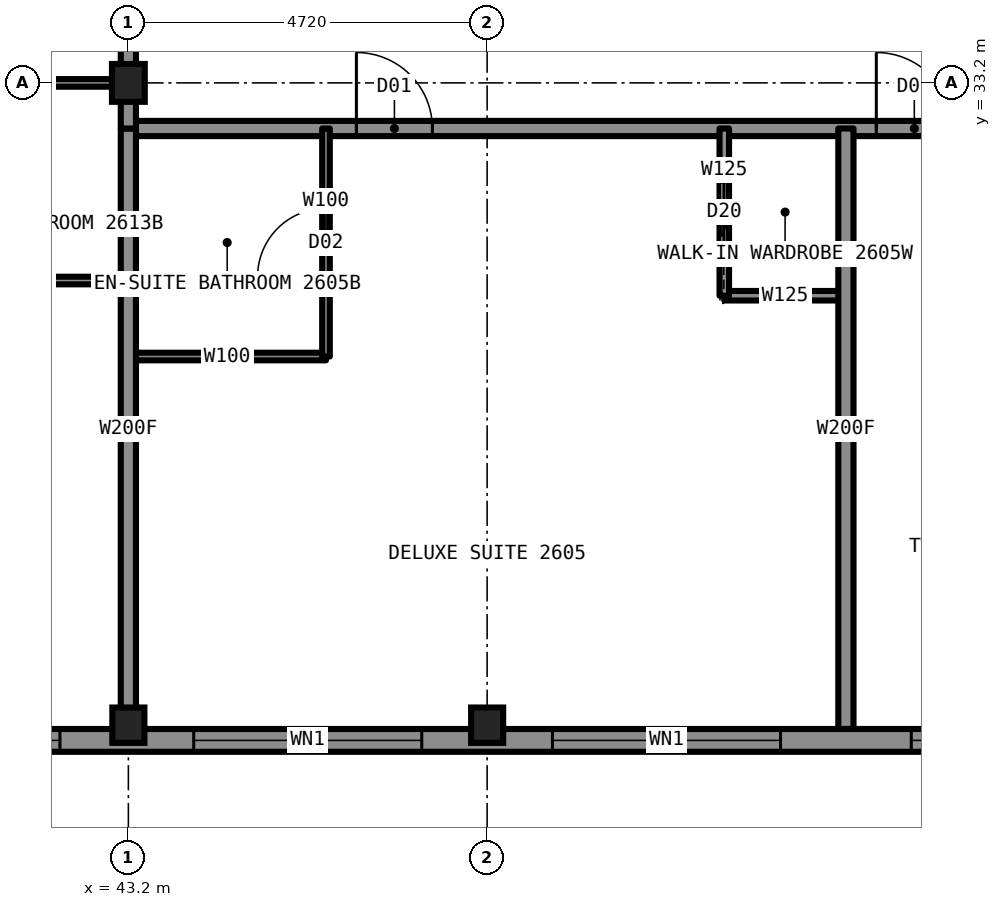
"""IFC4 building model, lengths in metres.
Left out: names, types, materials, properties, quantities, classifications, styles, units other than length and angle.
Written with IfcOpenShell. Run it as: python <this file> out.ifc"""

import sys

from ifc_helpers import new_model, si_unit, direction, frame, frame_2d, origin, origin_2d, place, context, subcontext, project, spatial, rectangle, i_section, extrude, element, fill, save


model = new_model("IFC4")
c1 = context("Model", 3, precision=1e-05, world=origin(), true_north=direction((0.0, 1.0)))
c2 = subcontext(c1, "Body", "Model", "MODEL_VIEW")
j1 = project(units=[si_unit("LENGTHUNIT", "METRE"), si_unit("PLANEANGLEUNIT", "RADIAN")], contexts=[c1])
p1 = place(None, origin())
s1 = spatial("IfcSite", under=j1, at=p1, CompositionType="ELEMENT")
p2 = place(p1, origin())
s2 = spatial("IfcBuilding", under=s1, at=p2, CompositionType="ELEMENT")
p3 = place(p2, frame((0.0, 0.0, 93.4)))
s3 = spatial("IfcBuildingStorey", under=s2, at=p3, CompositionType="ELEMENT", Elevation=93.4)
for number, where, z_axis, x_axis in (
    (1, (43.2, 24.75, 0.0), (0.0, 0.0, 1.0), (1.0, 0.0, 0.0)),
    (2, (47.92, 24.75, 0.0), (0.0, 0.0, 1.0), (1.0, 0.0, 0.0)),
):
    element("IfcColumn", number, at=place(p3, frame(where, z_axis=z_axis, x_axis=x_axis)), inside=s3, PredefinedType="COLUMN", context=c2, shape_type="SweptSolid", body=[
        extrude(i_section(OverallWidth=0.442, OverallDepth=0.531, WebThickness=0.066, FlangeThickness=0.106, at=origin_2d()), origin(), (0.0, 0.0, 1.0), 3.5),
    ])
p4 = place(p3, frame((43.2, 33.2, 0.0), z_axis=(0.0, 0.0, 1.0), x_axis=(1.0, 0.0, 0.0)))
e3 = element("IfcColumn", 3, at=p4, inside=s3, PredefinedType="COLUMN", context=c2, shape_type="SweptSolid", body=[
    extrude(i_section(OverallWidth=0.432, OverallDepth=0.498, WebThickness=0.056, FlangeThickness=0.089, at=origin_2d()), origin(), (0.0, 0.0, 1.0), 3.5),
])
p5 = place(p3, frame((40.6, 33.2, 0.0), z_axis=(0.0, 0.0, 1.0), x_axis=(1.0, 0.0, 0.0)))
e4 = element("IfcWall", 4, at=p5, inside=s3, PredefinedType="PARTITIONING", context=c2, shape_type="SweptSolid", body=[
    extrude(rectangle(XDim=2.6, YDim=0.1, at=frame_2d((1.3, 0.0))), origin(), (0.0, 0.0, 1.0), 2.573),
])
p6 = place(p3, frame((43.2, 32.6, 0.0), z_axis=(0.0, 0.0, 1.0), x_axis=(1.0, 0.0, 0.0)))
e5 = element("IfcWall", 5, at=p6, inside=s3, PredefinedType="PARTITIONING", context=c2, shape_type="SweptSolid", body=[
    extrude(rectangle(XDim=23.6, YDim=0.2, at=frame_2d((11.8, 0.0))), origin(), (0.0, 0.0, 1.0), 3.33),
])
p7 = place(p6, frame((3.0, 0.0, 0.0)))
e6 = element("IfcOpeningElement", 6, at=p7, cuts=e5, PredefinedType="OPENING", context=c2, shape_type="SweptSolid", body=[
    extrude(rectangle(XDim=1.0, YDim=2.2, at=frame_2d((0.5, 1.1))), frame((0.0, 0.11, 0.0), z_axis=(0.0, -1.0, 0.0), x_axis=(1.0, 0.0, 0.0)), (0.0, 0.0, 1.0), 0.22),
])
p8 = place(p6, frame((9.84, 0.0, 0.0)))
e7 = element("IfcOpeningElement", 7, at=p8, cuts=e5, PredefinedType="OPENING", context=c2, shape_type="SweptSolid", body=[
    extrude(rectangle(XDim=1.0, YDim=2.2, at=frame_2d((0.5, 1.1))), frame((0.0, 0.11, 0.0), z_axis=(0.0, -1.0, 0.0), x_axis=(1.0, 0.0, 0.0)), (0.0, 0.0, 1.0), 0.22),
])
p9 = place(p6, frame((17.16, 0.0, 0.0)))
e8 = element("IfcOpeningElement", 8, at=p9, cuts=e5, PredefinedType="OPENING", context=c2, shape_type="SweptSolid", body=[
    extrude(rectangle(XDim=1.0, YDim=2.2, at=frame_2d((0.5, 1.1))), frame((0.0, 0.11, 0.0), z_axis=(0.0, -1.0, 0.0), x_axis=(1.0, 0.0, 0.0)), (0.0, 0.0, 1.0), 0.22),
])
p10 = place(p3, frame((40.6, 30.6, 0.0), z_axis=(0.0, 0.0, 1.0), x_axis=(1.0, 0.0, 0.0)))
e9 = element("IfcWall", 9, at=p10, inside=s3, PredefinedType="PARTITIONING", context=c2, shape_type="SweptSolid", body=[
    extrude(rectangle(XDim=2.6, YDim=0.1, at=frame_2d((1.3, 0.0))), origin(), (0.0, 0.0, 1.0), 3.33),
])
p11 = place(p3, frame((51.04, 30.4, 0.0), z_axis=(0.0, 0.0, 1.0), x_axis=(1.0, 0.0, 0.0)))
e10 = element("IfcWall", 10, at=p11, inside=s3, PredefinedType="PARTITIONING", context=c2, shape_type="SweptSolid", body=[
    extrude(rectangle(XDim=1.6, YDim=0.125, at=frame_2d((0.8, 0.0))), origin(), (0.0, 0.0, 1.0), 3.33),
])
p12 = place(p3, frame((43.2, 29.6, 0.0), z_axis=(0.0, 0.0, 1.0), x_axis=(1.0, 0.0, 0.0)))
e11 = element("IfcWall", 11, at=p12, inside=s3, PredefinedType="PARTITIONING", context=c2, shape_type="SweptSolid", body=[
    extrude(rectangle(XDim=2.6, YDim=0.1, at=frame_2d((1.3, 0.0))), origin(), (0.0, 0.0, 1.0), 3.33),
])
p13 = place(p3, frame((43.2, 33.22, 0.0), z_axis=(0.0, 0.0, 1.0), x_axis=(0.0, 1.0, 0.0)))
e12 = element("IfcWall", 12, at=p13, inside=s3, PredefinedType="PARTITIONING", context=c2, shape_type="SweptSolid", body=[
    extrude(rectangle(XDim=23.56, YDim=0.2, at=frame_2d((11.78, 0.0))), origin(), (0.0, 0.0, 1.0), 3.33),
])
p14 = place(p13, frame((16.4, 0.0, 0.0)))
e13 = element("IfcOpeningElement", 13, at=p14, cuts=e12, PredefinedType="OPENING", context=c2, shape_type="SweptSolid", body=[
    extrude(rectangle(XDim=1.0, YDim=2.2, at=frame_2d((0.5, 1.1))), frame((0.0, 0.11, 0.0), z_axis=(0.0, -1.0, 0.0), x_axis=(1.0, 0.0, 0.0)), (0.0, 0.0, 1.0), 0.22),
])
p15 = place(p13, frame((21.83, 0.0, 0.0)))
e14 = element("IfcOpeningElement", 14, at=p15, cuts=e12, PredefinedType="OPENING", context=c2, shape_type="SweptSolid", body=[
    extrude(rectangle(XDim=1.1, YDim=2.2, at=frame_2d((0.55, 1.1))), frame((0.0, 0.11, 0.0), z_axis=(0.0, -1.0, 0.0), x_axis=(1.0, 0.0, 0.0)), (0.0, 0.0, 1.0), 0.22),
])
p16 = place(p13, frame((0.63, 0.0, 0.0)))
e15 = element("IfcOpeningElement", 15, at=p16, cuts=e12, PredefinedType="OPENING", context=c2, shape_type="SweptSolid", body=[
    extrude(rectangle(XDim=1.1, YDim=2.2, at=frame_2d((0.55, 1.1))), frame((0.0, 0.11, 0.0), z_axis=(0.0, -1.0, 0.0), x_axis=(1.0, 0.0, 0.0)), (0.0, 0.0, 1.0), 0.22),
])
p17 = place(p13, frame((7.45, 0.0, 0.0)))
e16 = element("IfcOpeningElement", 16, at=p17, cuts=e12, PredefinedType="OPENING", context=c2, shape_type="SweptSolid", body=[
    extrude(rectangle(XDim=2.0, YDim=2.4, at=frame_2d((1.0, 1.2))), frame((0.0, 0.11, 0.0), z_axis=(0.0, -1.0, 0.0), x_axis=(1.0, 0.0, 0.0)), (0.0, 0.0, 1.0), 0.22),
])
p18 = place(p13, frame((5.4, 0.0, 0.0)))
e17 = element("IfcOpeningElement", 17, at=p18, cuts=e12, PredefinedType="OPENING", context=c2, shape_type="SweptSolid", body=[
    extrude(rectangle(XDim=1.0, YDim=2.1, at=frame_2d((0.5, 1.05))), frame((0.0, 0.11, 0.0), z_axis=(0.0, -1.0, 0.0), x_axis=(1.0, 0.0, 0.0)), (0.0, 0.0, 1.0), 0.22),
])
p19 = place(p3, frame((43.2, 24.7, 0.0), z_axis=(0.0, 0.0, 1.0), x_axis=(0.0, 1.0, 0.0)))
e18 = element("IfcWall", 18, at=p19, inside=s3, PredefinedType="PARTITIONING", context=c2, shape_type="SweptSolid", body=[
    extrude(rectangle(XDim=7.9, YDim=0.2, at=frame_2d((3.95, 0.0))), origin(), (0.0, 0.0, 1.0), 2.573),
])
p20 = place(p3, frame((52.64, 24.7, 0.0), z_axis=(0.0, 0.0, 1.0), x_axis=(0.0, 1.0, 0.0)))
e19 = element("IfcWall", 19, at=p20, inside=s3, PredefinedType="PARTITIONING", context=c2, shape_type="SweptSolid", body=[
    extrude(rectangle(XDim=7.9, YDim=0.2, at=frame_2d((3.95, 0.0))), origin(), (0.0, 0.0, 1.0), 3.33),
])
p21 = place(p3, frame((51.04, 30.4, 0.0), z_axis=(0.0, 0.0, 1.0), x_axis=(0.0, 1.0, 0.0)))
e20 = element("IfcWall", 20, at=p21, inside=s3, PredefinedType="PARTITIONING", context=c2, shape_type="SweptSolid", body=[
    extrude(rectangle(XDim=2.2, YDim=0.125, at=frame_2d((1.1, 0.0))), origin(), (0.0, 0.0, 1.0), 3.33),
])
p22 = place(p21, frame((0.7, 0.0, 0.0)))
e21 = element("IfcOpeningElement", 21, at=p22, cuts=e20, PredefinedType="OPENING", context=c2, shape_type="SweptSolid", body=[
    extrude(rectangle(XDim=0.8, YDim=2.1, at=frame_2d((0.4, 1.05))), frame((0.0, 0.073, 0.0), z_axis=(0.0, -1.0, 0.0), x_axis=(1.0, 0.0, 0.0)), (0.0, 0.0, 1.0), 0.145),
])
p23 = place(p3, frame((45.8, 29.6, 0.0), z_axis=(0.0, 0.0, 1.0), x_axis=(0.0, 1.0, 0.0)))
e22 = element("IfcWall", 22, at=p23, inside=s3, PredefinedType="PARTITIONING", context=c2, shape_type="SweptSolid", body=[
    extrude(rectangle(XDim=3.0, YDim=0.1, at=frame_2d((1.5, 0.0))), origin(), (0.0, 0.0, 1.0), 3.33),
])
p24 = place(p23, frame((1.05, 0.0, 0.0)))
e23 = element("IfcOpeningElement", 23, at=p24, cuts=e22, PredefinedType="OPENING", context=c2, shape_type="SweptSolid", body=[
    extrude(rectangle(XDim=0.9, YDim=2.1, at=frame_2d((0.45, 1.05))), frame((0.0, 0.06, 0.0), z_axis=(0.0, -1.0, 0.0), x_axis=(1.0, 0.0, 0.0)), (0.0, 0.0, 1.0), 0.12),
])
p25 = place(p3, frame((39.9, 24.55, 0.0), z_axis=(0.0, 0.0, 1.0), x_axis=(1.0, 0.0, 0.0)))
e24 = element("IfcWall", 24, at=p25, inside=s3, PredefinedType="SOLIDWALL", context=c2, shape_type="SweptSolid", body=[
    extrude(rectangle(XDim=30.2, YDim=0.3, at=frame_2d((15.1, 0.0))), origin(), (0.0, 0.0, 1.0), 2.83),
])
p26 = place(p25, frame((0.85, 0.0, 0.5)))
e25 = element("IfcOpeningElement", 25, at=p26, cuts=e24, PredefinedType="OPENING", context=c2, shape_type="SweptSolid", body=[
    extrude(rectangle(XDim=1.6, YDim=2.0, at=frame_2d((0.8, 1.0))), frame((0.0, 0.16, 0.0), z_axis=(0.0, -1.0, 0.0), x_axis=(1.0, 0.0, 0.0)), (0.0, 0.0, 1.0), 0.32),
])
p27 = place(p25, frame((4.16, 0.0, 0.5)))
e26 = element("IfcOpeningElement", 26, at=p27, cuts=e24, PredefinedType="OPENING", context=c2, shape_type="SweptSolid", body=[
    extrude(rectangle(XDim=3.0, YDim=2.0, at=frame_2d((1.5, 1.0))), frame((0.0, 0.16, 0.0), z_axis=(0.0, -1.0, 0.0), x_axis=(1.0, 0.0, 0.0)), (0.0, 0.0, 1.0), 0.32),
])
p28 = place(p25, frame((8.88, 0.0, 0.5)))
e27 = element("IfcOpeningElement", 27, at=p28, cuts=e24, PredefinedType="OPENING", context=c2, shape_type="SweptSolid", body=[
    extrude(rectangle(XDim=3.0, YDim=2.0, at=frame_2d((1.5, 1.0))), frame((0.0, 0.16, 0.0), z_axis=(0.0, -1.0, 0.0), x_axis=(1.0, 0.0, 0.0)), (0.0, 0.0, 1.0), 0.32),
])
p29 = place(p25, frame((13.6, 0.0, 0.5)))
e28 = element("IfcOpeningElement", 28, at=p29, cuts=e24, PredefinedType="OPENING", context=c2, shape_type="SweptSolid", body=[
    extrude(rectangle(XDim=3.0, YDim=2.0, at=frame_2d((1.5, 1.0))), frame((0.0, 0.16, 0.0), z_axis=(0.0, -1.0, 0.0), x_axis=(1.0, 0.0, 0.0)), (0.0, 0.0, 1.0), 0.32),
])
p30 = place(p25, frame((18.32, 0.0, 0.5)))
e29 = element("IfcOpeningElement", 29, at=p30, cuts=e24, PredefinedType="OPENING", context=c2, shape_type="SweptSolid", body=[
    extrude(rectangle(XDim=3.0, YDim=2.0, at=frame_2d((1.5, 1.0))), frame((0.0, 0.16, 0.0), z_axis=(0.0, -1.0, 0.0), x_axis=(1.0, 0.0, 0.0)), (0.0, 0.0, 1.0), 0.32),
])
p31 = place(p25, frame((23.04, 0.0, 0.5)))
e30 = element("IfcOpeningElement", 30, at=p31, cuts=e24, PredefinedType="OPENING", context=c2, shape_type="SweptSolid", body=[
    extrude(rectangle(XDim=3.0, YDim=2.0, at=frame_2d((1.5, 1.0))), frame((0.0, 0.16, 0.0), z_axis=(0.0, -1.0, 0.0), x_axis=(1.0, 0.0, 0.0)), (0.0, 0.0, 1.0), 0.32),
])
p32 = place(p25, frame((27.75, 0.0, 0.5)))
e31 = element("IfcOpeningElement", 31, at=p32, cuts=e24, PredefinedType="OPENING", context=c2, shape_type="SweptSolid", body=[
    extrude(rectangle(XDim=1.6, YDim=2.0, at=frame_2d((0.8, 1.0))), frame((0.0, 0.16, 0.0), z_axis=(0.0, -1.0, 0.0), x_axis=(1.0, 0.0, 0.0)), (0.0, 0.0, 1.0), 0.32),
])
p33 = place(p3, frame((43.2, 32.6, 0.0), z_axis=(0.0, 0.0, 1.0), x_axis=(0.0, 1.0, 0.0)))
e32 = element("IfcWall", 32, at=p33, inside=s3, PredefinedType="PARTITIONING", context=c2, shape_type="SweptSolid", body=[
    extrude(rectangle(XDim=0.62, YDim=0.2, at=frame_2d((0.31, 0.0))), origin(), (0.0, 0.0, 1.0), 2.573),
])
p34 = place(p7, origin())
e33 = element("IfcDoor", 33, at=p34, inside=s3, OperationType="SINGLE_SWING_LEFT", PredefinedType="DOOR", context=c2, shape_type="SweptSolid", body=[
    extrude(rectangle(XDim=1.0, YDim=2.2, at=frame_2d((0.5, 1.1))), frame((0.0, 0.025, 0.0), z_axis=(0.0, -1.0, 0.0), x_axis=(1.0, 0.0, 0.0)), (0.0, 0.0, 1.0), 0.05),
])
fill(e6, e33)
p35 = place(p24, origin())
e34 = element("IfcDoor", 34, at=p35, inside=s3, OperationType="SINGLE_SWING_RIGHT", PredefinedType="DOOR", context=c2, shape_type="SweptSolid", body=[
    extrude(rectangle(XDim=0.9, YDim=2.1, at=frame_2d((0.45, 1.05))), frame((0.0, 0.025, 0.0), z_axis=(0.0, -1.0, 0.0), x_axis=(1.0, 0.0, 0.0)), (0.0, 0.0, 1.0), 0.05),
])
fill(e23, e34)
p36 = place(p22, origin())
e35 = element("IfcDoor", 35, at=p36, inside=s3, OperationType="SLIDING_TO_LEFT", PredefinedType="DOOR", context=c2, shape_type="SweptSolid", body=[
    extrude(rectangle(XDim=0.8, YDim=2.1, at=frame_2d((0.4, 1.05))), frame((0.0, 0.025, 0.0), z_axis=(0.0, -1.0, 0.0), x_axis=(1.0, 0.0, 0.0)), (0.0, 0.0, 1.0), 0.05),
])
fill(e21, e35)
p37 = place(p8, origin())
e36 = element("IfcDoor", 36, at=p37, inside=s3, OperationType="SINGLE_SWING_LEFT", PredefinedType="DOOR", context=c2, shape_type="SweptSolid", body=[
    extrude(rectangle(XDim=1.0, YDim=2.2, at=frame_2d((0.5, 1.1))), frame((0.0, 0.025, 0.0), z_axis=(0.0, -1.0, 0.0), x_axis=(1.0, 0.0, 0.0)), (0.0, 0.0, 1.0), 0.05),
])
fill(e7, e36)
p38 = place(p26, origin())
e37 = element("IfcWindow", 37, at=p38, inside=s3, PartitioningType="SINGLE_PANEL", PredefinedType="WINDOW", context=c2, shape_type="SweptSolid", body=[
    extrude(rectangle(XDim=1.6, YDim=2.0, at=frame_2d((0.8, 1.0))), frame((0.0, 0.03, 0.0), z_axis=(0.0, -1.0, 0.0), x_axis=(1.0, 0.0, 0.0)), (0.0, 0.0, 1.0), 0.06),
])
fill(e25, e37)
p39 = place(p27, origin())
e38 = element("IfcWindow", 38, at=p39, inside=s3, PartitioningType="SINGLE_PANEL", PredefinedType="WINDOW", context=c2, shape_type="SweptSolid", body=[
    extrude(rectangle(XDim=3.0, YDim=2.0, at=frame_2d((1.5, 1.0))), frame((0.0, 0.03, 0.0), z_axis=(0.0, -1.0, 0.0), x_axis=(1.0, 0.0, 0.0)), (0.0, 0.0, 1.0), 0.06),
])
fill(e26, e38)
p40 = place(p28, origin())
e39 = element("IfcWindow", 39, at=p40, inside=s3, PartitioningType="SINGLE_PANEL", PredefinedType="WINDOW", context=c2, shape_type="SweptSolid", body=[
    extrude(rectangle(XDim=3.0, YDim=2.0, at=frame_2d((1.5, 1.0))), frame((0.0, 0.03, 0.0), z_axis=(0.0, -1.0, 0.0), x_axis=(1.0, 0.0, 0.0)), (0.0, 0.0, 1.0), 0.06),
])
fill(e27, e39)
p41 = place(p29, origin())
e40 = element("IfcWindow", 40, at=p41, inside=s3, PartitioningType="SINGLE_PANEL", PredefinedType="WINDOW", context=c2, shape_type="SweptSolid", body=[
    extrude(rectangle(XDim=3.0, YDim=2.0, at=frame_2d((1.5, 1.0))), frame((0.0, 0.03, 0.0), z_axis=(0.0, -1.0, 0.0), x_axis=(1.0, 0.0, 0.0)), (0.0, 0.0, 1.0), 0.06),
])
fill(e28, e40)
save(model, sys.argv[1])
